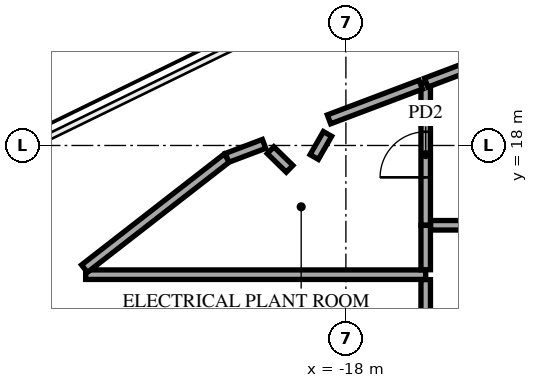
"""IFC4 building model, lengths in metres.
Left out: names, types, materials, properties, quantities, classifications, styles, units other than length and angle.
Written with IfcOpenShell. Run it as: python <this file> out.ifc"""

import sys

from ifc_helpers import new_model, si_unit, direction, frame, frame_2d, origin, place, context, subcontext, project, spatial, rectangle, extrude, element, fill, save


model = new_model("IFC4")
c1 = context("Model", 3, precision=1e-05, world=origin(), true_north=direction((0.0, 1.0)))
c2 = subcontext(c1, "Body", "Model", "MODEL_VIEW")
j1 = project(units=[si_unit("LENGTHUNIT", "METRE"), si_unit("PLANEANGLEUNIT", "RADIAN")], contexts=[c1])
p1 = place(None, origin())
s1 = spatial("IfcSite", under=j1, at=p1, CompositionType="ELEMENT")
p2 = place(p1, origin())
s2 = spatial("IfcBuilding", under=s1, at=p2, CompositionType="ELEMENT")
p3 = place(p2, frame((0.0, 0.0, 130.1)))
s3 = spatial("IfcBuildingStorey", under=s2, at=p3, CompositionType="ELEMENT", Elevation=130.1)
p4 = place(p3, frame((-24.848, 14.6, 0.0), z_axis=(0.0, 0.0, 1.0), x_axis=(1.0, 0.0, 0.0)))
e1 = element("IfcWall", 1, at=p4, inside=s3, PredefinedType="PARTITIONING", context=c2, shape_type="SweptSolid", body=[
    extrude(rectangle(XDim=8.948, YDim=0.25, at=frame_2d((4.474, 0.0))), origin(), (0.0, 0.0, 1.0), 4.172),
])
p5 = place(p3, frame((-24.88, 14.758, 0.0), z_axis=(0.0, 0.0, 1.0), x_axis=(0.789451876253, 0.61381245921, 0.0)))
e2 = element("IfcWall", 2, at=p5, inside=s3, PredefinedType="PARTITIONING", context=c2, shape_type="SweptSolid", body=[
    extrude(rectangle(XDim=4.748, YDim=0.25, at=frame_2d((2.374, 0.0))), origin(), (0.0, 0.0, 1.0), 5.2),
])
p6 = place(p3, frame((-15.9, 14.73, 0.0), z_axis=(0.0, 0.0, 1.0), x_axis=(0.0, 1.0, 0.0)))
e3 = element("IfcWall", 3, at=p6, inside=s3, PredefinedType="PARTITIONING", context=c2, shape_type="SweptSolid", body=[
    extrude(rectangle(XDim=1.17, YDim=0.25, at=frame_2d((0.585, 0.0))), origin(), (0.0, 0.0, 1.0), 4.63),
])
p7 = place(p3, frame((-15.9, 11.937, 0.0), z_axis=(0.0, 0.0, 1.0), x_axis=(0.0, 1.0, 0.0)))
e4 = element("IfcWall", 4, at=p7, inside=s3, PredefinedType="PARTITIONING", context=c2, shape_type="SweptSolid", body=[
    extrude(rectangle(XDim=2.533, YDim=0.25, at=frame_2d((1.267, 0.0))), origin(), (0.0, 0.0, 1.0), 4.63),
])
p8 = place(p3, frame((-15.9, 15.905, 0.0), z_axis=(0.0, 0.0, 1.0), x_axis=(0.0, 1.0, 0.0)))
e5 = element("IfcWall", 5, at=p8, inside=s3, PredefinedType="PARTITIONING", context=c2, shape_type="SweptSolid", body=[
    extrude(rectangle(XDim=3.744, YDim=0.25, at=frame_2d((1.872, 0.0))), origin(), (0.0, 0.0, 1.0), 4.172),
])
p9 = place(p8, frame((1.256, 0.0, 0.0)))
e6 = element("IfcOpeningElement", 6, at=p9, cuts=e5, PredefinedType="OPENING", context=c2, shape_type="SweptSolid", body=[
    extrude(rectangle(XDim=1.2, YDim=2.1, at=frame_2d((0.6, 1.05))), frame((0.0, 0.135, 0.0), z_axis=(0.0, -1.0, 0.0), x_axis=(1.0, 0.0, 0.0)), (0.0, 0.0, 1.0), 0.27),
])
p10 = place(p3, frame((-15.77, 15.9, 0.0), z_axis=(0.0, 0.0, 1.0), x_axis=(1.0, 0.0, 0.0)))
e7 = element("IfcWall", 7, at=p10, inside=s3, PredefinedType="PARTITIONING", context=c2, shape_type="SweptSolid", body=[
    extrude(rectangle(XDim=12.87, YDim=0.25, at=frame_2d((6.435, 0.0))), origin(), (0.0, 0.0, 1.0), 4.63),
])
p11 = place(p10, frame((5.77, 0.0, 0.0)))
e8 = element("IfcOpeningElement", 8, at=p11, cuts=e7, PredefinedType="OPENING", context=c2, shape_type="SweptSolid", body=[
    extrude(rectangle(XDim=1.2, YDim=2.1, at=frame_2d((0.6, 1.05))), frame((0.0, 0.135, 0.0), z_axis=(0.0, -1.0, 0.0), x_axis=(1.0, 0.0, 0.0)), (0.0, 0.0, 1.0), 0.27),
])
p12 = place(p3, frame((-21.126, 17.675, 0.0), z_axis=(0.0, 0.0, 1.0), x_axis=(0.935506582458, 0.35330926138, 0.0)))
e9 = element("IfcWall", 9, at=p12, inside=s3, PredefinedType="PARTITIONING", context=c2, shape_type="SweptSolid", body=[
    extrude(rectangle(XDim=1.04, YDim=0.25, at=frame_2d((0.52, 0.0))), origin(), (0.0, 0.0, 1.0), 5.2),
])
for number, where, z_axis, x_axis in (
    (10, (-18.833, 17.696, 0.0), (0.0, 0.0, 1.0), (0.498, 0.867, 0.0)),
    (11, (-19.983, 17.876, 0.0), (0.0, 0.0, 1.0), (0.716, -0.699, 0.0)),
):
    element("IfcWall", number, at=place(p3, frame(where, z_axis=z_axis, x_axis=x_axis)), inside=s3, PredefinedType="PARTITIONING", context=c2, shape_type="SweptSolid", body=[
        extrude(rectangle(XDim=0.701, YDim=0.25, at=frame_2d((0.351, 0.0))), origin(), (0.0, 0.0, 1.0), 5.2),
    ])
p13 = place(p3, frame((-18.445, 18.688, 0.0), z_axis=(0.0, 0.0, 1.0), x_axis=(0.935490853033, 0.353350907586, 0.0)))
e12 = element("IfcWall", 12, at=p13, inside=s3, PredefinedType="PARTITIONING", context=c2, shape_type="SweptSolid", body=[
    extrude(rectangle(XDim=2.581, YDim=0.25, at=frame_2d((1.291, 0.0))), origin(), (0.0, 0.0, 1.0), 5.2),
])
p14 = place(p3, frame((-15.887, 19.654, 0.0), z_axis=(0.0, 0.0, 1.0), x_axis=(0.935489638932, 0.353354121881, 0.0)))
e13 = element("IfcWall", 13, at=p14, inside=s3, PredefinedType="PARTITIONING", context=c2, shape_type="SweptSolid", body=[
    extrude(rectangle(XDim=1.942, YDim=0.25, at=frame_2d((0.971, 0.0))), origin(), (0.0, 0.0, 1.0), 5.2),
])
p15 = place(p9, origin())
e14 = element("IfcDoor", 14, at=p15, inside=s3, OperationType="SINGLE_SWING_RIGHT", PredefinedType="DOOR", context=c2, shape_type="SweptSolid", body=[
    extrude(rectangle(XDim=1.2, YDim=2.1, at=frame_2d((0.6, 1.05))), frame((0.0, 0.025, 0.0), z_axis=(0.0, -1.0, 0.0), x_axis=(1.0, 0.0, 0.0)), (0.0, 0.0, 1.0), 0.05),
])
fill(e6, e14)
save(model, sys.argv[1])
